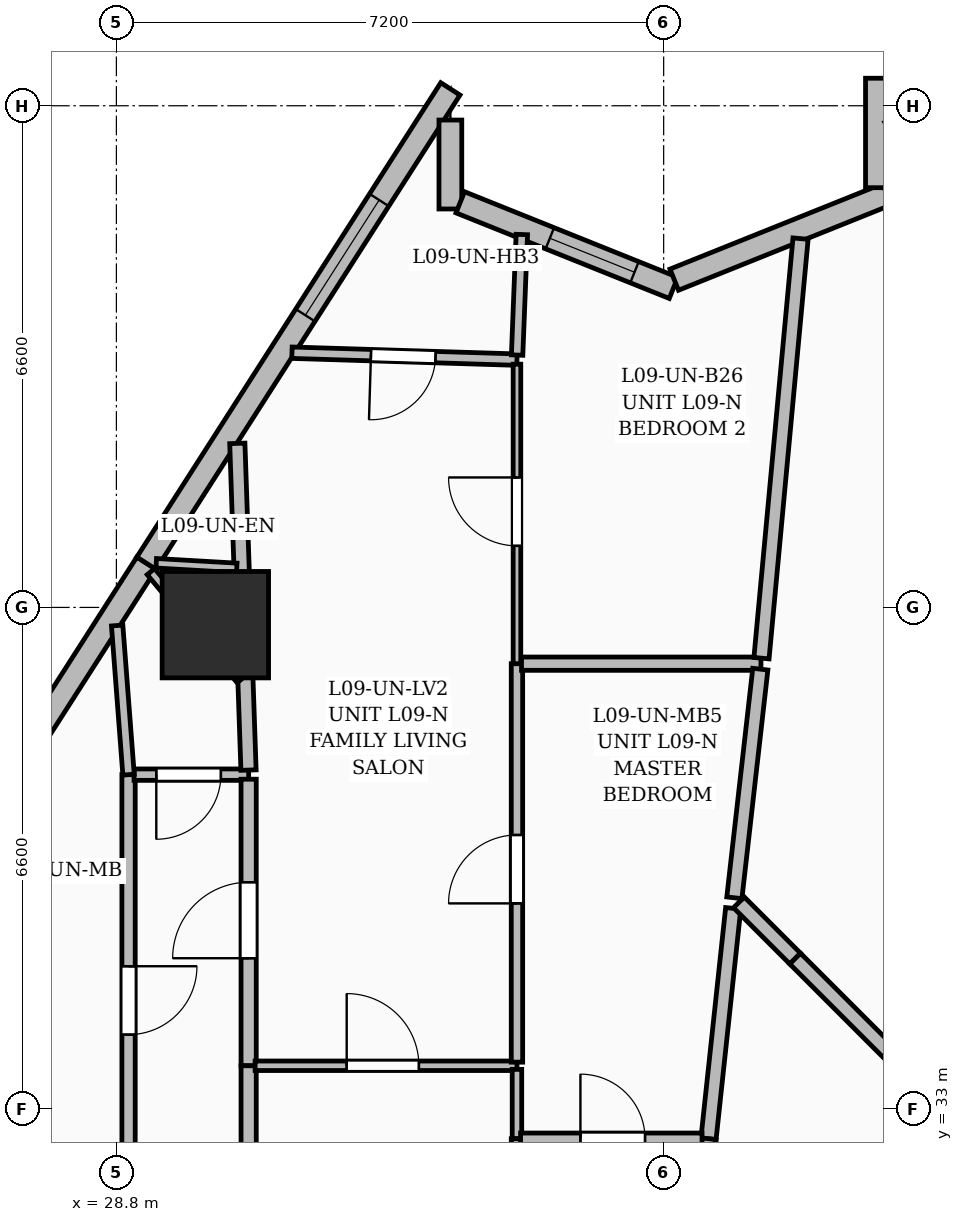
"""IFC4 building model, lengths in metres.
Left out: names, types, materials, properties, quantities, classifications, styles, units other than length and angle.
Written with IfcOpenShell. Run it as: python <this file> out.ifc"""

import sys

from ifc_helpers import new_model, si_unit, direction, frame, frame_2d, origin, origin_2d, place, context, subcontext, project, spatial, rectangle, extrude, element, fill, save


model = new_model("IFC4")
c1 = context("Model", 3, precision=1e-05, world=origin(), true_north=direction((0.0, 1.0)))
c2 = subcontext(c1, "Body", "Model", "MODEL_VIEW")
j1 = project(units=[si_unit("LENGTHUNIT", "METRE"), si_unit("PLANEANGLEUNIT", "RADIAN")], contexts=[c1])
p1 = place(None, origin())
s1 = spatial("IfcSite", under=j1, at=p1, CompositionType="ELEMENT")
p2 = place(p1, origin())
s2 = spatial("IfcBuilding", under=s1, at=p2, CompositionType="ELEMENT")
p3 = place(p2, frame((0.0, 0.0, 42.6)))
s3 = spatial("IfcBuildingStorey", under=s2, at=p3, CompositionType="ELEMENT", Elevation=42.6)
p4 = place(p3, frame((30.102, 39.373, 0.0), z_axis=(0.0, 0.0, 1.0), x_axis=(1.0, 0.0, 0.0)))
e1 = element("IfcColumn", 1, at=p4, inside=s3, PredefinedType="COLUMN", context=c2, shape_type="SweptSolid", body=[
    extrude(rectangle(XDim=1.4, YDim=1.4, at=origin_2d()), origin(), (0.0, 0.0, 1.0), 3.6),
])
p5 = place(p3, frame((25.197, 33.941, 0.0), z_axis=(0.0, 0.0, 1.0), x_axis=(0.539535005594, 0.841963168873, 0.0)))
e2 = element("IfcWall", 2, at=p5, inside=s3, PredefinedType="SOLIDWALL", context=c2, shape_type="SweptSolid", body=[
    extrude(rectangle(XDim=7.412, YDim=0.3, at=frame_2d((3.706, 0.0))), origin(), (0.0, 0.0, 1.0), 3.35),
])
p6 = place(p5, frame((0.625, 0.0, 0.6)))
e3 = element("IfcOpeningElement", 3, at=p6, cuts=e2, PredefinedType="OPENING", context=c2, shape_type="SweptSolid", body=[
    extrude(rectangle(XDim=1.8, YDim=2.1, at=frame_2d((0.9, 1.05))), frame((0.0, 0.16, 0.0), z_axis=(0.0, -1.0, 0.0), x_axis=(1.0, 0.0, 0.0)), (0.0, 0.0, 1.0), 0.32),
])
p7 = place(p3, frame((29.195, 40.182, 0.0), z_axis=(0.0, 0.0, 1.0), x_axis=(0.539520042018, 0.841972757434, 0.0)))
e4 = element("IfcWall", 4, at=p7, inside=s3, PredefinedType="SOLIDWALL", context=c2, shape_type="SweptSolid", body=[
    extrude(rectangle(XDim=7.412, YDim=0.3, at=frame_2d((3.706, 0.0))), origin(), (0.0, 0.0, 1.0), 3.35),
])
p8 = place(p7, frame((3.875, 0.0, 0.6)))
e5 = element("IfcOpeningElement", 5, at=p8, cuts=e4, PredefinedType="OPENING", context=c2, shape_type="SweptSolid", body=[
    extrude(rectangle(XDim=1.8, YDim=2.1, at=frame_2d((0.9, 1.05))), frame((0.0, 0.16, 0.0), z_axis=(0.0, -1.0, 0.0), x_axis=(1.0, 0.0, 0.0)), (0.0, 0.0, 1.0), 0.32),
])
p9 = place(p3, frame((33.194, 46.012, 0.0), z_axis=(0.0, 0.0, 1.0), x_axis=(0.0, -1.0, 0.0)))
e6 = element("IfcWall", 6, at=p9, inside=s3, PredefinedType="SOLIDWALL", context=c2, shape_type="SweptSolid", body=[
    extrude(rectangle(XDim=1.17, YDim=0.3, at=frame_2d((0.585, 0.0))), origin(), (0.0, 0.0, 1.0), 3.35),
])
p10 = place(p3, frame((33.324, 44.93, 0.0), z_axis=(0.0, 0.0, 1.0), x_axis=(0.928091921944, -0.372351157407, 0.0)))
e7 = element("IfcWall", 7, at=p10, inside=s3, PredefinedType="SOLIDWALL", context=c2, shape_type="SweptSolid", body=[
    extrude(rectangle(XDim=3.023, YDim=0.3, at=frame_2d((1.512, 0.0))), origin(), (0.0, 0.0, 1.0), 3.35),
])
p11 = place(p10, frame((1.27, 0.0, 0.8)))
e8 = element("IfcOpeningElement", 8, at=p11, cuts=e7, PredefinedType="OPENING", context=c2, shape_type="SweptSolid", body=[
    extrude(rectangle(XDim=1.2, YDim=1.8, at=frame_2d((0.6, 0.9))), frame((0.0, 0.16, 0.0), z_axis=(0.0, -1.0, 0.0), x_axis=(1.0, 0.0, 0.0)), (0.0, 0.0, 1.0), 0.32),
])
p12 = place(p3, frame((36.139, 43.912, 0.0), z_axis=(0.0, 0.0, 1.0), x_axis=(0.928057043086, 0.372438081804, 0.0)))
e9 = element("IfcWall", 9, at=p12, inside=s3, PredefinedType="SOLIDWALL", context=c2, shape_type="SweptSolid", body=[
    extrude(rectangle(XDim=3.013, YDim=0.3, at=frame_2d((1.507, 0.0))), origin(), (0.0, 0.0, 1.0), 3.35),
])
p13 = place(p3, frame((38.806, 45.122, 0.0), z_axis=(0.0, 0.0, 1.0), x_axis=(0.0, 1.0, 0.0)))
e10 = element("IfcWall", 10, at=p13, inside=s3, PredefinedType="SOLIDWALL", context=c2, shape_type="SweptSolid", body=[
    extrude(rectangle(XDim=1.44, YDim=0.3, at=frame_2d((0.72, 0.0))), origin(), (0.0, 0.0, 1.0), 3.35),
])
p14 = place(p3, frame((36.915, 35.641, 0.0), z_axis=(0.0, 0.0, 1.0), x_axis=(-0.106606653323, -0.994301272989, 0.0)))
e11 = element("IfcWall", 11, at=p14, inside=s3, PredefinedType="PARTITIONING", context=c2, shape_type="SweptSolid", body=[
    extrude(rectangle(XDim=3.048, YDim=0.2, at=frame_2d((1.524, 0.0))), origin(), (0.0, 0.0, 1.0), 2.787),
])
p15 = place(p3, frame((36.59, 32.61, 0.0), z_axis=(0.0, 0.0, 1.0), x_axis=(-0.109241237924, -0.994015267457, 0.0)))
e12 = element("IfcWall", 12, at=p15, inside=s3, PredefinedType="PARTITIONING", context=c2, shape_type="SweptSolid", body=[
    extrude(rectangle(XDim=2.747, YDim=0.2, at=frame_2d((1.373, 0.0))), origin(), (0.0, 0.0, 1.0), 2.787),
])
p16 = place(p3, frame((37.73, 34.98, 0.0), z_axis=(0.0, 0.0, 1.0), x_axis=(-0.707106781187, 0.707106781187, 0.0)))
e13 = element("IfcWall", 13, at=p16, inside=s3, PredefinedType="PARTITIONING", context=c2, shape_type="SweptSolid", body=[
    extrude(rectangle(XDim=1.046, YDim=0.2, at=frame_2d((0.523, 0.0))), origin(), (0.0, 0.0, 1.0), 2.787),
])
p17 = place(p3, frame((40.99, 31.72, 0.0), z_axis=(0.0, 0.0, 1.0), x_axis=(-0.707106781187, 0.707106781187, 0.0)))
e14 = element("IfcWall", 14, at=p17, inside=s3, PredefinedType="PARTITIONING", context=c2, shape_type="SweptSolid", body=[
    extrude(rectangle(XDim=4.61, YDim=0.2, at=frame_2d((2.305, 0.0))), origin(), (0.0, 0.0, 1.0), 2.787),
])
p18 = place(p3, frame((28.96, 37.4, 0.0), z_axis=(0.0, 0.0, 1.0), x_axis=(0.0, -1.0, 0.0)))
e15 = element("IfcWall", 15, at=p18, inside=s3, PredefinedType="PARTITIONING", context=c2, shape_type="SweptSolid", body=[
    extrude(rectangle(XDim=6.06, YDim=0.175, at=frame_2d((3.03, 0.0))), origin(), (0.0, 0.0, 1.0), 2.37),
])
p19 = place(p18, frame((2.521, 0.0, 0.0)))
e16 = element("IfcOpeningElement", 16, at=p19, cuts=e15, PredefinedType="OPENING", context=c2, shape_type="SweptSolid", body=[
    extrude(rectangle(XDim=0.9, YDim=2.15, at=frame_2d((0.45, 1.075))), frame((0.0, 0.097, 0.0), z_axis=(0.0, -1.0, 0.0), x_axis=(1.0, 0.0, 0.0)), (0.0, 0.0, 1.0), 0.195),
])
p20 = place(p3, frame((30.54, 37.4, 0.0), z_axis=(0.0, 0.0, 1.0), x_axis=(-1.0, 0.0, 0.0)))
e17 = element("IfcWall", 17, at=p20, inside=s3, PredefinedType="PARTITIONING", context=c2, shape_type="SweptSolid", body=[
    extrude(rectangle(XDim=1.508, YDim=0.15, at=frame_2d((0.754, 0.0))), origin(), (0.0, 0.0, 1.0), 2.37),
])
p21 = place(p20, frame((0.365, 0.0, 0.0)))
e18 = element("IfcOpeningElement", 18, at=p21, cuts=e17, PredefinedType="OPENING", context=c2, shape_type="SweptSolid", body=[
    extrude(rectangle(XDim=0.85, YDim=2.1, at=frame_2d((0.425, 1.05))), frame((0.0, 0.085, 0.0), z_axis=(0.0, -1.0, 0.0), x_axis=(1.0, 0.0, 0.0)), (0.0, 0.0, 1.0), 0.17),
])
p22 = place(p3, frame((30.54, 33.57, 0.0), z_axis=(0.0, 0.0, 1.0), x_axis=(0.0, 1.0, 0.0)))
e19 = element("IfcWall", 19, at=p22, inside=s3, PredefinedType="PARTITIONING", context=c2, shape_type="SweptSolid", body=[
    extrude(rectangle(XDim=3.77, YDim=0.2, at=frame_2d((1.885, 0.0))), origin(), (0.0, 0.0, 1.0), 3.35),
])
p23 = place(p22, frame((1.415, 0.0, 0.0)))
e20 = element("IfcOpeningElement", 20, at=p23, cuts=e19, PredefinedType="OPENING", context=c2, shape_type="SweptSolid", body=[
    extrude(rectangle(XDim=1.0, YDim=2.2, at=frame_2d((0.5, 1.1))), frame((0.0, 0.11, 0.0), z_axis=(0.0, -1.0, 0.0), x_axis=(1.0, 0.0, 0.0)), (0.0, 0.0, 1.0), 0.22),
])
p24 = place(p3, frame((30.54, 29.88, 0.0), z_axis=(0.0, 0.0, 1.0), x_axis=(0.0, 1.0, 0.0)))
e21 = element("IfcWall", 21, at=p24, inside=s3, PredefinedType="PARTITIONING", context=c2, shape_type="SweptSolid", body=[
    extrude(rectangle(XDim=3.69, YDim=0.2, at=frame_2d((1.845, 0.0))), origin(), (0.0, 0.0, 1.0), 2.787),
])
p25 = place(p3, frame((28.96, 37.4, 0.0), z_axis=(0.0, 0.0, 1.0), x_axis=(-0.076174693918, 0.997094487, 0.0)))
e22 = element("IfcWall", 22, at=p25, inside=s3, PredefinedType="PARTITIONING", context=c2, shape_type="SweptSolid", body=[
    extrude(rectangle(XDim=1.968, YDim=0.15, at=frame_2d((0.984, 0.0))), origin(), (0.0, 0.0, 1.0), 2.37),
])
p26 = place(p3, frame((30.538, 37.46, 0.0), z_axis=(0.0, 0.0, 1.0), x_axis=(-0.034231559151, 0.999413928439, 0.0)))
e23 = element("IfcWall", 23, at=p26, inside=s3, PredefinedType="PARTITIONING", context=c2, shape_type="SweptSolid", body=[
    extrude(rectangle(XDim=4.301, YDim=0.2, at=frame_2d((2.15, 0.0))), origin(), (0.0, 0.0, 1.0), 2.279),
])
p27 = place(p3, frame((34.07, 42.86, 0.0), z_axis=(0.0, 0.0, 1.0), x_axis=(-0.999529610614, 0.030668509992, 0.0)))
e24 = element("IfcWall", 24, at=p27, inside=s3, PredefinedType="PARTITIONING", context=c2, shape_type="SweptSolid", body=[
    extrude(rectangle(XDim=2.961, YDim=0.15, at=frame_2d((1.481, 0.0))), origin(), (0.0, 0.0, 1.0), 3.35),
])
p28 = place(p27, frame((1.072, 0.0, 0.0)))
e25 = element("IfcOpeningElement", 25, at=p28, cuts=e24, PredefinedType="OPENING", context=c2, shape_type="SweptSolid", body=[
    extrude(rectangle(XDim=0.85, YDim=2.1, at=frame_2d((0.425, 1.05))), frame((0.0, 0.085, 0.0), z_axis=(0.0, -1.0, 0.0), x_axis=(1.0, 0.0, 0.0)), (0.0, 0.0, 1.0), 0.17),
])
p29 = place(p3, frame((30.625, 33.57, 0.0), z_axis=(0.0, 0.0, 1.0), x_axis=(1.0, 0.0, 0.0)))
e26 = element("IfcWall", 26, at=p29, inside=s3, PredefinedType="PARTITIONING", context=c2, shape_type="SweptSolid", body=[
    extrude(rectangle(XDim=3.445, YDim=0.125, at=frame_2d((1.723, 0.0))), origin(), (0.0, 0.0, 1.0), 2.279),
])
p30 = place(p29, frame((1.205, 0.0, 0.0)))
e27 = element("IfcOpeningElement", 27, at=p30, cuts=e26, PredefinedType="OPENING", context=c2, shape_type="SweptSolid", body=[
    extrude(rectangle(XDim=0.95, YDim=2.2, at=frame_2d((0.475, 1.1))), frame((0.0, 0.072, 0.0), z_axis=(0.0, -1.0, 0.0), x_axis=(1.0, 0.0, 0.0)), (0.0, 0.0, 1.0), 0.145),
])
p31 = place(p3, frame((34.07, 33.617, 0.0), z_axis=(0.0, 0.0, 1.0), x_axis=(0.0, 1.0, 0.0)))
e28 = element("IfcWall", 28, at=p31, inside=s3, PredefinedType="PARTITIONING", context=c2, shape_type="SweptSolid", body=[
    extrude(rectangle(XDim=5.243, YDim=0.15, at=frame_2d((2.621, 0.0))), origin(), (0.0, 0.0, 1.0), 2.787),
])
p32 = place(p31, frame((2.089, 0.0, 0.0)))
e29 = element("IfcOpeningElement", 29, at=p32, cuts=e28, PredefinedType="OPENING", context=c2, shape_type="SweptSolid", body=[
    extrude(rectangle(XDim=0.9, YDim=2.15, at=frame_2d((0.45, 1.075))), frame((0.0, 0.085, 0.0), z_axis=(0.0, -1.0, 0.0), x_axis=(1.0, 0.0, 0.0)), (0.0, 0.0, 1.0), 0.17),
])
p33 = place(p3, frame((34.07, 38.86, 0.0), z_axis=(0.0, 0.0, 1.0), x_axis=(0.0, 1.0, 0.0)))
e30 = element("IfcWall", 30, at=p33, inside=s3, PredefinedType="PARTITIONING", context=c2, shape_type="SweptSolid", body=[
    extrude(rectangle(XDim=3.94, YDim=0.1, at=frame_2d((1.97, 0.0))), origin(), (0.0, 0.0, 1.0), 2.37),
])
p34 = place(p33, frame((1.55, 0.0, 0.0)))
e31 = element("IfcOpeningElement", 31, at=p34, cuts=e30, PredefinedType="OPENING", context=c2, shape_type="SweptSolid", body=[
    extrude(rectangle(XDim=0.9, YDim=2.15, at=frame_2d((0.45, 1.075))), frame((0.0, 0.06, 0.0), z_axis=(0.0, -1.0, 0.0), x_axis=(1.0, 0.0, 0.0)), (0.0, 0.0, 1.0), 0.12),
])
p35 = place(p3, frame((34.072, 42.92, 0.0), z_axis=(0.0, 0.0, 1.0), x_axis=(0.039065124417, 0.999236666688, 0.0)))
e32 = element("IfcWall", 32, at=p35, inside=s3, PredefinedType="PARTITIONING", context=c2, shape_type="SweptSolid", body=[
    extrude(rectangle(XDim=1.587, YDim=0.15, at=frame_2d((0.794, 0.0))), origin(), (0.0, 0.0, 1.0), 3.35),
])
p36 = place(p3, frame((34.07, 32.61, 0.0), z_axis=(0.0, 0.0, 1.0), x_axis=(0.0, 1.0, 0.0)))
e33 = element("IfcWall", 33, at=p36, inside=s3, PredefinedType="PARTITIONING", context=c2, shape_type="SweptSolid", body=[
    extrude(rectangle(XDim=0.912, YDim=0.125, at=frame_2d((0.456, 0.0))), origin(), (0.0, 0.0, 1.0), 2.279),
])
p37 = place(p3, frame((34.07, 29.965, 0.0), z_axis=(0.0, 0.0, 1.0), x_axis=(0.0, 1.0, 0.0)))
e34 = element("IfcWall", 34, at=p37, inside=s3, PredefinedType="PARTITIONING", context=c2, shape_type="SweptSolid", body=[
    extrude(rectangle(XDim=2.645, YDim=0.15, at=frame_2d((1.323, 0.0))), origin(), (0.0, 0.0, 1.0), 2.279),
])
p38 = place(p3, frame((37.28, 38.86, 0.0), z_axis=(0.0, 0.0, 1.0), x_axis=(-1.0, 0.0, 0.0)))
e35 = element("IfcWall", 35, at=p38, inside=s3, PredefinedType="PARTITIONING", context=c2, shape_type="SweptSolid", body=[
    extrude(rectangle(XDim=3.15, YDim=0.175, at=frame_2d((1.575, 0.0))), origin(), (0.0, 0.0, 1.0), 3.35),
])
p39 = place(p3, frame((34.117, 32.61, 0.0), z_axis=(0.0, 0.0, 1.0), x_axis=(1.0, 0.0, 0.0)))
e36 = element("IfcWall", 36, at=p39, inside=s3, PredefinedType="PARTITIONING", context=c2, shape_type="SweptSolid", body=[
    extrude(rectangle(XDim=2.387, YDim=0.15, at=frame_2d((1.194, 0.0))), origin(), (0.0, 0.0, 1.0), 2.279),
])
p40 = place(p39, frame((0.788, 0.0, 0.0)))
e37 = element("IfcOpeningElement", 37, at=p40, cuts=e36, PredefinedType="OPENING", context=c2, shape_type="SweptSolid", body=[
    extrude(rectangle(XDim=0.85, YDim=2.1, at=frame_2d((0.425, 1.05))), frame((0.0, 0.085, 0.0), z_axis=(0.0, -1.0, 0.0), x_axis=(1.0, 0.0, 0.0)), (0.0, 0.0, 1.0), 0.17),
])
p41 = place(p3, frame((36.93, 35.78, 0.0), z_axis=(0.0, 0.0, 1.0), x_axis=(0.112900640855, 0.993606282838, 0.0)))
e38 = element("IfcWall", 38, at=p41, inside=s3, PredefinedType="PARTITIONING", context=c2, shape_type="SweptSolid", body=[
    extrude(rectangle(XDim=3.027, YDim=0.2, at=frame_2d((1.514, 0.0))), origin(), (0.0, 0.0, 1.0), 3.35),
])
p42 = place(p3, frame((37.801, 44.452, 0.0), z_axis=(0.0, 0.0, 1.0), x_axis=(-0.092703584654, -0.995693750805, 0.0)))
e39 = element("IfcWall", 39, at=p42, inside=s3, PredefinedType="PARTITIONING", context=c2, shape_type="SweptSolid", body=[
    extrude(rectangle(XDim=5.544, YDim=0.2, at=frame_2d((2.772, 0.0))), origin(), (0.0, 0.0, 1.0), 2.37),
])
p43 = place(p3, frame((30.384, 40.12, 0.0), z_axis=(0.0, 0.0, 1.0), x_axis=(-0.998358205937, 0.057279076792, 0.0)))
e40 = element("IfcWall", 40, at=p43, inside=s3, PredefinedType="PARTITIONING", context=c2, shape_type="SweptSolid", body=[
    extrude(rectangle(XDim=1.061, YDim=0.125, at=frame_2d((0.531, 0.0))), origin(), (0.0, 0.0, 1.0), 3.35),
])
p44 = place(p3, frame((29.254, 40.071, 0.0), z_axis=(0.0, 0.0, 1.0), x_axis=(0.639548106723, -0.76875107752, 0.0)))
e41 = element("IfcWall", 41, at=p44, inside=s3, PredefinedType="PARTITIONING", context=c2, shape_type="SweptSolid", body=[
    extrude(rectangle(XDim=1.85, YDim=0.125, at=frame_2d((0.925, 0.0))), origin(), (0.0, 0.0, 1.0), 2.279),
])
p45 = place(p8, origin())
e42 = element("IfcWindow", 42, at=p45, inside=s3, PartitioningType="SINGLE_PANEL", PredefinedType="WINDOW", context=c2, shape_type="SweptSolid", body=[
    extrude(rectangle(XDim=1.8, YDim=2.1, at=frame_2d((0.9, 1.05))), frame((0.0, 0.03, 0.0), z_axis=(0.0, -1.0, 0.0), x_axis=(1.0, 0.0, 0.0)), (0.0, 0.0, 1.0), 0.06),
])
fill(e5, e42)
p46 = place(p11, origin())
e43 = element("IfcWindow", 43, at=p46, inside=s3, PartitioningType="SINGLE_PANEL", PredefinedType="WINDOW", context=c2, shape_type="SweptSolid", body=[
    extrude(rectangle(XDim=1.2, YDim=1.8, at=frame_2d((0.6, 0.9))), frame((0.0, 0.03, 0.0), z_axis=(0.0, -1.0, 0.0), x_axis=(1.0, 0.0, 0.0)), (0.0, 0.0, 1.0), 0.06),
])
fill(e8, e43)
p47 = place(p19, origin())
e44 = element("IfcDoor", 44, at=p47, inside=s3, OperationType="SINGLE_SWING_LEFT", PredefinedType="DOOR", context=c2, shape_type="SweptSolid", body=[
    extrude(rectangle(XDim=0.9, YDim=2.15, at=frame_2d((0.45, 1.075))), frame((0.0, 0.025, 0.0), z_axis=(0.0, -1.0, 0.0), x_axis=(1.0, 0.0, 0.0)), (0.0, 0.0, 1.0), 0.05),
])
fill(e16, e44)
p48 = place(p21, origin())
e45 = element("IfcDoor", 45, at=p48, inside=s3, OperationType="SINGLE_SWING_RIGHT", PredefinedType="DOOR", context=c2, shape_type="SweptSolid", body=[
    extrude(rectangle(XDim=0.85, YDim=2.1, at=frame_2d((0.425, 1.05))), frame((0.0, 0.025, 0.0), z_axis=(0.0, -1.0, 0.0), x_axis=(1.0, 0.0, 0.0)), (0.0, 0.0, 1.0), 0.05),
])
fill(e18, e45)
p49 = place(p30, origin())
e46 = element("IfcDoor", 46, at=p49, inside=s3, OperationType="SINGLE_SWING_LEFT", PredefinedType="DOOR", context=c2, shape_type="SweptSolid", body=[
    extrude(rectangle(XDim=0.95, YDim=2.2, at=frame_2d((0.475, 1.1))), frame((0.0, 0.025, 0.0), z_axis=(0.0, -1.0, 0.0), x_axis=(1.0, 0.0, 0.0)), (0.0, 0.0, 1.0), 0.05),
])
fill(e27, e46)
p50 = place(p28, origin())
e47 = element("IfcDoor", 47, at=p50, inside=s3, OperationType="SINGLE_SWING_RIGHT", PredefinedType="DOOR", context=c2, shape_type="SweptSolid", body=[
    extrude(rectangle(XDim=0.85, YDim=2.1, at=frame_2d((0.425, 1.05))), frame((0.0, 0.025, 0.0), z_axis=(0.0, -1.0, 0.0), x_axis=(1.0, 0.0, 0.0)), (0.0, 0.0, 1.0), 0.05),
])
fill(e25, e47)
p51 = place(p32, origin())
e48 = element("IfcDoor", 48, at=p51, inside=s3, OperationType="SINGLE_SWING_LEFT", PredefinedType="DOOR", context=c2, shape_type="SweptSolid", body=[
    extrude(rectangle(XDim=0.9, YDim=2.15, at=frame_2d((0.45, 1.075))), frame((0.0, 0.025, 0.0), z_axis=(0.0, -1.0, 0.0), x_axis=(1.0, 0.0, 0.0)), (0.0, 0.0, 1.0), 0.05),
])
fill(e29, e48)
p52 = place(p34, origin())
e49 = element("IfcDoor", 49, at=p52, inside=s3, OperationType="SINGLE_SWING_RIGHT", PredefinedType="DOOR", context=c2, shape_type="SweptSolid", body=[
    extrude(rectangle(XDim=0.9, YDim=2.15, at=frame_2d((0.45, 1.075))), frame((0.0, 0.025, 0.0), z_axis=(0.0, -1.0, 0.0), x_axis=(1.0, 0.0, 0.0)), (0.0, 0.0, 1.0), 0.05),
])
fill(e31, e49)
p53 = place(p40, origin())
e50 = element("IfcDoor", 50, at=p53, inside=s3, OperationType="SINGLE_SWING_LEFT", PredefinedType="DOOR", context=c2, shape_type="SweptSolid", body=[
    extrude(rectangle(XDim=0.85, YDim=2.1, at=frame_2d((0.425, 1.05))), frame((0.0, 0.025, 0.0), z_axis=(0.0, -1.0, 0.0), x_axis=(1.0, 0.0, 0.0)), (0.0, 0.0, 1.0), 0.05),
])
fill(e37, e50)
p54 = place(p23, origin())
e51 = element("IfcDoor", 51, at=p54, inside=s3, OperationType="SINGLE_SWING_LEFT", PredefinedType="DOOR", context=c2, shape_type="SweptSolid", body=[
    extrude(rectangle(XDim=1.0, YDim=2.2, at=frame_2d((0.5, 1.1))), frame((0.0, 0.025, 0.0), z_axis=(0.0, -1.0, 0.0), x_axis=(1.0, 0.0, 0.0)), (0.0, 0.0, 1.0), 0.05),
])
fill(e20, e51)
save(model, sys.argv[1])
